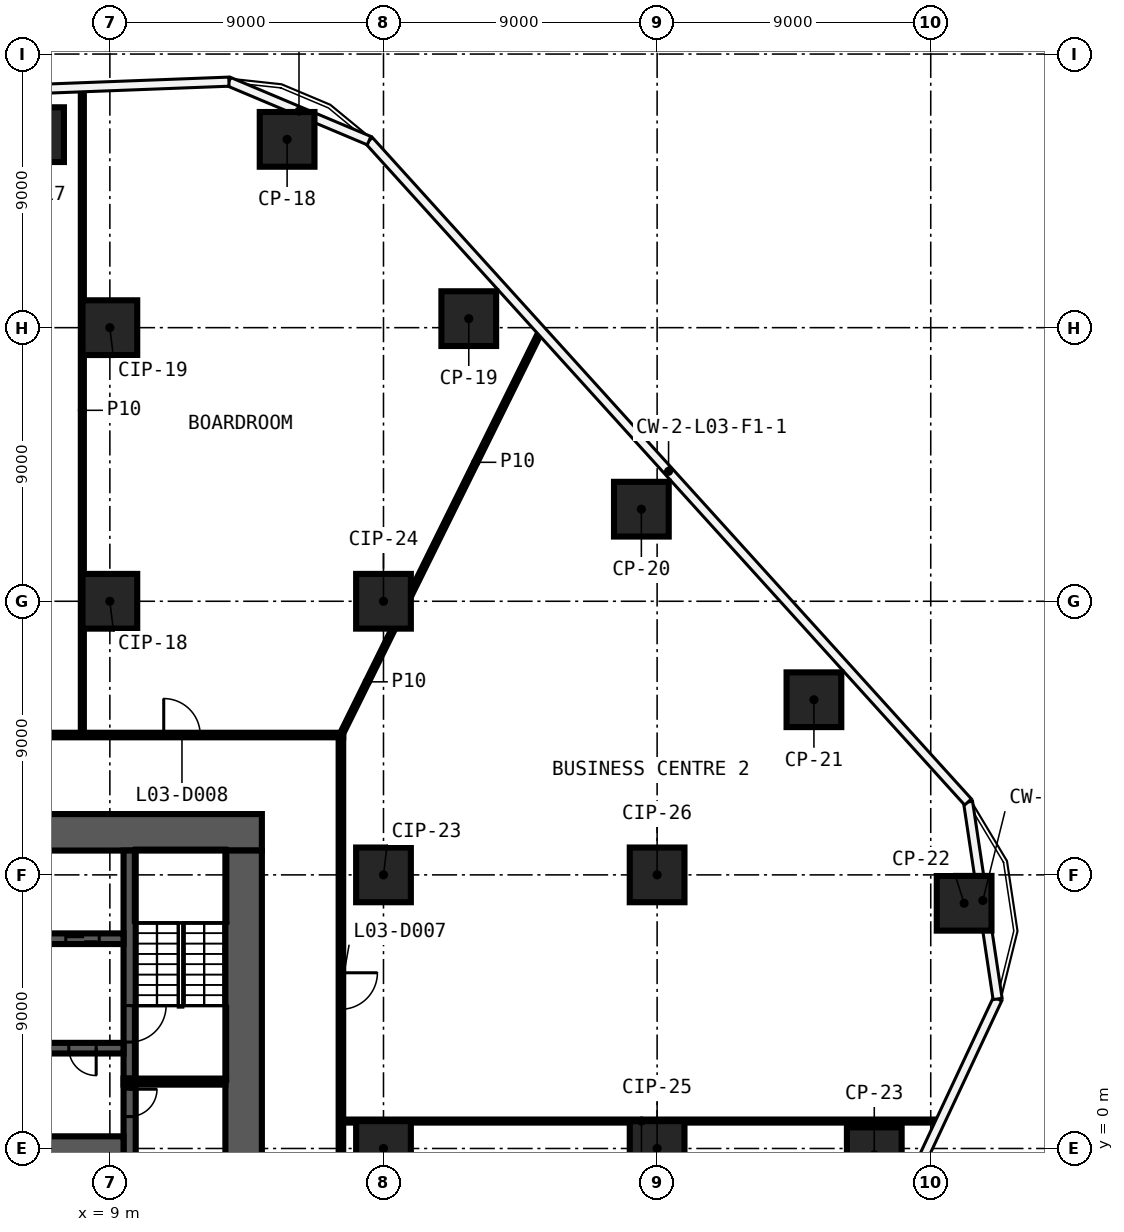
"""IFC4 building model, lengths in metres.
Left out: names, types, materials, properties, quantities, classifications, styles, units other than length and angle.
Written with IfcOpenShell. Run it as: python <this file> out.ifc"""

import sys

from ifc_helpers import new_model, si_unit, direction, frame, frame_2d, origin, origin_2d, place, context, subcontext, project, spatial, rectangle, extrude, element, fill, save


model = new_model("IFC4")
c1 = context("Model", 3, precision=1e-05, world=origin(), true_north=direction((0.0, 1.0)))
c2 = subcontext(c1, "Body", "Model", "MODEL_VIEW")
j1 = project(units=[si_unit("LENGTHUNIT", "METRE"), si_unit("PLANEANGLEUNIT", "RADIAN")], contexts=[c1])
p1 = place(None, origin())
s1 = spatial("IfcSite", under=j1, at=p1, CompositionType="ELEMENT")
p2 = place(p1, origin())
s2 = spatial("IfcBuilding", under=s1, at=p2, CompositionType="ELEMENT")
p3 = place(p2, frame((0.0, 0.0, 27.0)))
s3 = spatial("IfcBuildingStorey", under=s2, at=p3, CompositionType="ELEMENT", Elevation=27.0)
for number, where, z_axis, x_axis in (
    (1, (6.589, 33.349, 0.0), (0.0, 0.0, 1.0), (1.0, 0.0, 0.0)),
    (2, (14.83, 33.194, 0.0), (0.0, 0.0, 1.0), (1.0, 0.0, 0.0)),
    (3, (20.805, 27.297, 0.0), (0.0, 0.0, 1.0), (1.0, 0.0, 0.0)),
    (4, (26.482, 21.029, 0.0), (0.0, 0.0, 1.0), (1.0, 0.0, 0.0)),
    (5, (32.158, 14.761, 0.0), (0.0, 0.0, 1.0), (1.0, 0.0, 0.0)),
    (6, (37.098, 8.066, 0.0), (0.0, 0.0, 1.0), (1.0, 0.0, 0.0)),
    (7, (34.143, -0.205, 0.0), (0.0, 0.0, 1.0), (1.0, 0.0, 0.0)),
    (8, (9.0, 18.0, 0.0), (0.0, 0.0, 1.0), (1.0, 0.0, 0.0)),
    (9, (9.0, 27.0, 0.0), (0.0, 0.0, 1.0), (1.0, 0.0, 0.0)),
    (10, (18.0, 0.0, 0.0), (0.0, 0.0, 1.0), (1.0, 0.0, 0.0)),
    (11, (18.0, 9.0, 0.0), (0.0, 0.0, 1.0), (1.0, 0.0, 0.0)),
    (12, (18.0, 18.0, 0.0), (0.0, 0.0, 1.0), (1.0, 0.0, 0.0)),
    (13, (27.0, 0.0, 0.0), (0.0, 0.0, 1.0), (1.0, 0.0, 0.0)),
    (14, (27.0, 9.0, 0.0), (0.0, 0.0, 1.0), (1.0, 0.0, 0.0)),
):
    element("IfcColumn", number, at=place(p3, frame(where, z_axis=z_axis, x_axis=x_axis)), inside=s3, PredefinedType="COLUMN", context=c2, shape_type="SweptSolid", body=[
        extrude(rectangle(XDim=1.8, YDim=1.8, at=origin_2d()), origin(), (0.0, 0.0, 1.0), 5.55),
    ])
p4 = place(p3, frame((16.675, 0.902, 0.0), z_axis=(0.0, 0.0, 1.0), x_axis=(1.0, 0.0, 0.0)))
e15 = element("IfcWall", 15, at=p4, inside=s3, PredefinedType="PARTITIONING", context=c2, shape_type="SweptSolid", body=[
    extrude(rectangle(XDim=19.621, YDim=0.1, at=frame_2d((9.811, 0.0))), origin(), (0.0, 0.0, 1.0), 5.55),
])
p5 = place(p3, frame((-16.675, 13.6, 0.0), z_axis=(0.0, 0.0, 1.0), x_axis=(1.0, 0.0, 0.0)))
e16 = element("IfcWall", 16, at=p5, inside=s3, PredefinedType="PARTITIONING", context=c2, shape_type="SweptSolid", body=[
    extrude(rectangle(XDim=33.35, YDim=0.15, at=frame_2d((16.675, 0.0))), origin(), (0.0, 0.0, 1.0), 5.55),
])
p6 = place(p5, frame((27.447, 0.0, 0.0)))
e17 = element("IfcOpeningElement", 17, at=p6, cuts=e16, PredefinedType="OPENING", context=c2, shape_type="SweptSolid", body=[
    extrude(rectangle(XDim=1.2, YDim=2.1, at=frame_2d((0.6, 1.05))), frame((0.0, 0.085, 0.0), z_axis=(0.0, -1.0, 0.0), x_axis=(1.0, 0.0, 0.0)), (0.0, 0.0, 1.0), 0.17),
])
p7 = place(p5, frame((19.346, 0.0, 0.0)))
e18 = element("IfcOpeningElement", 18, at=p7, cuts=e16, PredefinedType="OPENING", context=c2, shape_type="SweptSolid", body=[
    extrude(rectangle(XDim=1.2, YDim=2.1, at=frame_2d((0.6, 1.05))), frame((0.0, 0.085, 0.0), z_axis=(0.0, -1.0, 0.0), x_axis=(1.0, 0.0, 0.0)), (0.0, 0.0, 1.0), 0.17),
])
p8 = place(p3, frame((16.6, 13.6, 0.0), z_axis=(0.0, 0.0, 1.0), x_axis=(0.443207247844, 0.896419173969, 0.0)))
e19 = element("IfcWall", 19, at=p8, inside=s3, PredefinedType="PARTITIONING", context=c2, shape_type="SweptSolid", body=[
    extrude(rectangle(XDim=3.905, YDim=0.1, at=frame_2d((1.952, 0.0))), origin(), (0.0, 0.0, 1.0), 5.55),
])
p9 = place(p3, frame((18.9, 18.253, 0.0), z_axis=(0.0, 0.0, 1.0), x_axis=(0.443225904803, 0.89640994936, 0.0)))
e20 = element("IfcWall", 20, at=p9, inside=s3, PredefinedType="PARTITIONING", context=c2, shape_type="SweptSolid", body=[
    extrude(rectangle(XDim=9.635, YDim=0.1, at=frame_2d((4.817, 0.0))), origin(), (0.0, 0.0, 1.0), 5.55),
])
p10 = place(p3, frame((16.6, 13.525, 0.0), z_axis=(0.0, 0.0, 1.0), x_axis=(0.0, -1.0, 0.0)))
e21 = element("IfcWall", 21, at=p10, inside=s3, PredefinedType="PARTITIONING", context=c2, shape_type="SweptSolid", body=[
    extrude(rectangle(XDim=27.05, YDim=0.15, at=frame_2d((13.525, 0.0))), origin(), (0.0, 0.0, 1.0), 5.55),
])
p11 = place(p10, frame((16.006, 0.0, 0.0)))
e22 = element("IfcOpeningElement", 22, at=p11, cuts=e21, PredefinedType="OPENING", context=c2, shape_type="SweptSolid", body=[
    extrude(rectangle(XDim=1.2, YDim=2.1, at=frame_2d((0.6, 1.05))), frame((0.0, 0.085, 0.0), z_axis=(0.0, -1.0, 0.0), x_axis=(1.0, 0.0, 0.0)), (0.0, 0.0, 1.0), 0.17),
])
p12 = place(p10, frame((7.745, 0.0, 0.0)))
e23 = element("IfcOpeningElement", 23, at=p12, cuts=e21, PredefinedType="OPENING", context=c2, shape_type="SweptSolid", body=[
    extrude(rectangle(XDim=1.2, YDim=2.1, at=frame_2d((0.6, 1.05))), frame((0.0, 0.085, 0.0), z_axis=(0.0, -1.0, 0.0), x_axis=(1.0, 0.0, 0.0)), (0.0, 0.0, 1.0), 0.17),
])
p13 = place(p3, frame((8.095, 13.675, 0.0), z_axis=(0.0, 0.0, 1.0), x_axis=(0.0, 1.0, 0.0)))
e24 = element("IfcWall", 24, at=p13, inside=s3, PredefinedType="PARTITIONING", context=c2, shape_type="SweptSolid", body=[
    extrude(rectangle(XDim=21.213, YDim=0.1, at=frame_2d((10.606, 0.0))), origin(), (0.0, 0.0, 1.0), 5.55),
])
p14 = place(p3, frame((-14.0, 10.4, 0.0), z_axis=(0.0, 0.0, 1.0), x_axis=(1.0, 0.0, 0.0)))
e25 = element("IfcWall", 25, at=p14, inside=s3, PredefinedType="SHEAR", context=c2, shape_type="SweptSolid", body=[
    extrude(rectangle(XDim=28.0, YDim=1.2, at=frame_2d((14.0, 0.0))), origin(), (0.0, 0.0, 1.0), 5.55),
])
p15 = place(p14, frame((15.9, 0.0, 0.0)))
e26 = element("IfcOpeningElement", 26, at=p15, cuts=e25, PredefinedType="OPENING", context=c2, shape_type="SweptSolid", body=[
    extrude(rectangle(XDim=1.6, YDim=2.1, at=frame_2d((0.8, 1.05))), frame((0.0, 0.61, 0.0), z_axis=(0.0, -1.0, 0.0), x_axis=(1.0, 0.0, 0.0)), (0.0, 0.0, 1.0), 1.22),
])
p16 = place(p3, frame((13.4, 9.8, 0.0), z_axis=(0.0, 0.0, 1.0), x_axis=(0.0, -1.0, 0.0)))
e27 = element("IfcWall", 27, at=p16, inside=s3, PredefinedType="SHEAR", context=c2, shape_type="SweptSolid", body=[
    extrude(rectangle(XDim=19.6, YDim=1.2, at=frame_2d((9.8, 0.0))), origin(), (0.0, 0.0, 1.0), 5.55),
])
p17 = place(p3, frame((9.65, 2.1, 0.0), z_axis=(0.0, 0.0, 1.0), x_axis=(0.0, -1.0, 0.0)))
e28 = element("IfcWall", 28, at=p17, inside=s3, PredefinedType="SHEAR", context=c2, shape_type="SweptSolid", body=[
    extrude(rectangle(XDim=4.2, YDim=0.4, at=frame_2d((2.1, 0.0))), origin(), (0.0, 0.0, 1.0), 5.55),
])
p18 = place(p17, frame((0.15, 0.0, 0.0)))
e29 = element("IfcOpeningElement", 29, at=p18, cuts=e28, PredefinedType="OPENING", context=c2, shape_type="SweptSolid", body=[
    extrude(rectangle(XDim=0.9, YDim=2.1, at=frame_2d((0.45, 1.05))), frame((0.0, 0.21, 0.0), z_axis=(0.0, -1.0, 0.0), x_axis=(1.0, 0.0, 0.0)), (0.0, 0.0, 1.0), 0.42),
])
p19 = place(p3, frame((9.65, 9.8, 0.0), z_axis=(0.0, 0.0, 1.0), x_axis=(0.0, -1.0, 0.0)))
e30 = element("IfcWall", 30, at=p19, inside=s3, PredefinedType="SHEAR", context=c2, shape_type="SweptSolid", body=[
    extrude(rectangle(XDim=7.5, YDim=0.4, at=frame_2d((3.75, 0.0))), origin(), (0.0, 0.0, 1.0), 5.55),
])
p20 = place(p19, frame((5.1, 0.0, 0.0)))
e31 = element("IfcOpeningElement", 31, at=p20, cuts=e30, PredefinedType="OPENING", context=c2, shape_type="SweptSolid", body=[
    extrude(rectangle(XDim=1.2, YDim=2.1, at=frame_2d((0.6, 1.05))), frame((0.0, 0.21, 0.0), z_axis=(0.0, -1.0, 0.0), x_axis=(1.0, 0.0, 0.0)), (0.0, 0.0, 1.0), 0.42),
])
p21 = place(p3, frame((9.45, 2.2, 0.0), z_axis=(0.0, 0.0, 1.0), x_axis=(1.0, 0.0, 0.0)))
e32 = element("IfcWall", 32, at=p21, inside=s3, PredefinedType="SHEAR", context=c2, shape_type="SweptSolid", body=[
    extrude(rectangle(XDim=3.35, YDim=0.2, at=frame_2d((1.675, 0.0))), origin(), (0.0, 0.0, 1.0), 5.55),
])
p22 = place(p3, frame((-9.45, 6.9, 0.0), z_axis=(0.0, 0.0, 1.0), x_axis=(1.0, 0.0, 0.0)))
e33 = element("IfcWall", 33, at=p22, inside=s3, PredefinedType="SHEAR", context=c2, shape_type="SweptSolid", body=[
    extrude(rectangle(XDim=18.9, YDim=0.35, at=frame_2d((9.45, 0.0))), origin(), (0.0, 0.0, 1.0), 5.55),
])
p23 = place(p22, frame((0.8, 0.0, 0.0)))
e34 = element("IfcOpeningElement", 34, at=p23, cuts=e33, PredefinedType="OPENING", context=c2, shape_type="SweptSolid", body=[
    extrude(rectangle(XDim=1.1, YDim=2.1, at=frame_2d((0.55, 1.05))), frame((0.0, 0.185, 0.0), z_axis=(0.0, -1.0, 0.0), x_axis=(1.0, 0.0, 0.0)), (0.0, 0.0, 1.0), 0.37),
])
p24 = place(p22, frame((3.5, 0.0, 0.0)))
e35 = element("IfcOpeningElement", 35, at=p24, cuts=e33, PredefinedType="OPENING", context=c2, shape_type="SweptSolid", body=[
    extrude(rectangle(XDim=1.1, YDim=2.1, at=frame_2d((0.55, 1.05))), frame((0.0, 0.185, 0.0), z_axis=(0.0, -1.0, 0.0), x_axis=(1.0, 0.0, 0.0)), (0.0, 0.0, 1.0), 0.37),
])
p25 = place(p22, frame((6.2, 0.0, 0.0)))
e36 = element("IfcOpeningElement", 36, at=p25, cuts=e33, PredefinedType="OPENING", context=c2, shape_type="SweptSolid", body=[
    extrude(rectangle(XDim=1.1, YDim=2.1, at=frame_2d((0.55, 1.05))), frame((0.0, 0.185, 0.0), z_axis=(0.0, -1.0, 0.0), x_axis=(1.0, 0.0, 0.0)), (0.0, 0.0, 1.0), 0.37),
])
p26 = place(p22, frame((8.9, 0.0, 0.0)))
e37 = element("IfcOpeningElement", 37, at=p26, cuts=e33, PredefinedType="OPENING", context=c2, shape_type="SweptSolid", body=[
    extrude(rectangle(XDim=1.1, YDim=2.1, at=frame_2d((0.55, 1.05))), frame((0.0, 0.185, 0.0), z_axis=(0.0, -1.0, 0.0), x_axis=(1.0, 0.0, 0.0)), (0.0, 0.0, 1.0), 0.37),
])
p27 = place(p22, frame((11.55, 0.0, 0.0)))
e38 = element("IfcOpeningElement", 38, at=p27, cuts=e33, PredefinedType="OPENING", context=c2, shape_type="SweptSolid", body=[
    extrude(rectangle(XDim=1.2, YDim=2.1, at=frame_2d((0.6, 1.05))), frame((0.0, 0.185, 0.0), z_axis=(0.0, -1.0, 0.0), x_axis=(1.0, 0.0, 0.0)), (0.0, 0.0, 1.0), 0.37),
])
p28 = place(p22, frame((14.3, 0.0, 0.0)))
e39 = element("IfcOpeningElement", 39, at=p28, cuts=e33, PredefinedType="OPENING", context=c2, shape_type="SweptSolid", body=[
    extrude(rectangle(XDim=1.1, YDim=2.1, at=frame_2d((0.55, 1.05))), frame((0.0, 0.185, 0.0), z_axis=(0.0, -1.0, 0.0), x_axis=(1.0, 0.0, 0.0)), (0.0, 0.0, 1.0), 0.37),
])
p29 = place(p22, frame((17.0, 0.0, 0.0)))
e40 = element("IfcOpeningElement", 40, at=p29, cuts=e33, PredefinedType="OPENING", context=c2, shape_type="SweptSolid", body=[
    extrude(rectangle(XDim=1.1, YDim=2.1, at=frame_2d((0.55, 1.05))), frame((0.0, 0.185, 0.0), z_axis=(0.0, -1.0, 0.0), x_axis=(1.0, 0.0, 0.0)), (0.0, 0.0, 1.0), 0.37),
])
p30 = place(p3, frame((9.45, 3.3, 0.0), z_axis=(0.0, 0.0, 1.0), x_axis=(-1.0, 0.0, 0.0)))
e41 = element("IfcWall", 41, at=p30, inside=s3, PredefinedType="SHEAR", context=c2, shape_type="SweptSolid", body=[
    extrude(rectangle(XDim=18.9, YDim=0.35, at=frame_2d((9.45, 0.0))), origin(), (0.0, 0.0, 1.0), 5.55),
])
p31 = place(p30, frame((17.0, 0.0, 0.0)))
e42 = element("IfcOpeningElement", 42, at=p31, cuts=e41, PredefinedType="OPENING", context=c2, shape_type="SweptSolid", body=[
    extrude(rectangle(XDim=1.1, YDim=2.1, at=frame_2d((0.55, 1.05))), frame((0.0, 0.185, 0.0), z_axis=(0.0, -1.0, 0.0), x_axis=(1.0, 0.0, 0.0)), (0.0, 0.0, 1.0), 0.37),
])
p32 = place(p30, frame((14.3, 0.0, 0.0)))
e43 = element("IfcOpeningElement", 43, at=p32, cuts=e41, PredefinedType="OPENING", context=c2, shape_type="SweptSolid", body=[
    extrude(rectangle(XDim=1.1, YDim=2.1, at=frame_2d((0.55, 1.05))), frame((0.0, 0.185, 0.0), z_axis=(0.0, -1.0, 0.0), x_axis=(1.0, 0.0, 0.0)), (0.0, 0.0, 1.0), 0.37),
])
p33 = place(p30, frame((11.6, 0.0, 0.0)))
e44 = element("IfcOpeningElement", 44, at=p33, cuts=e41, PredefinedType="OPENING", context=c2, shape_type="SweptSolid", body=[
    extrude(rectangle(XDim=1.1, YDim=2.1, at=frame_2d((0.55, 1.05))), frame((0.0, 0.185, 0.0), z_axis=(0.0, -1.0, 0.0), x_axis=(1.0, 0.0, 0.0)), (0.0, 0.0, 1.0), 0.37),
])
p34 = place(p30, frame((8.9, 0.0, 0.0)))
e45 = element("IfcOpeningElement", 45, at=p34, cuts=e41, PredefinedType="OPENING", context=c2, shape_type="SweptSolid", body=[
    extrude(rectangle(XDim=1.1, YDim=2.1, at=frame_2d((0.55, 1.05))), frame((0.0, 0.185, 0.0), z_axis=(0.0, -1.0, 0.0), x_axis=(1.0, 0.0, 0.0)), (0.0, 0.0, 1.0), 0.37),
])
p35 = place(p30, frame((6.2, 0.0, 0.0)))
e46 = element("IfcOpeningElement", 46, at=p35, cuts=e41, PredefinedType="OPENING", context=c2, shape_type="SweptSolid", body=[
    extrude(rectangle(XDim=1.1, YDim=2.1, at=frame_2d((0.55, 1.05))), frame((0.0, 0.185, 0.0), z_axis=(0.0, -1.0, 0.0), x_axis=(1.0, 0.0, 0.0)), (0.0, 0.0, 1.0), 0.37),
])
p36 = place(p30, frame((3.5, 0.0, 0.0)))
e47 = element("IfcOpeningElement", 47, at=p36, cuts=e41, PredefinedType="OPENING", context=c2, shape_type="SweptSolid", body=[
    extrude(rectangle(XDim=1.1, YDim=2.1, at=frame_2d((0.55, 1.05))), frame((0.0, 0.185, 0.0), z_axis=(0.0, -1.0, 0.0), x_axis=(1.0, 0.0, 0.0)), (0.0, 0.0, 1.0), 0.37),
])
p37 = place(p30, frame((0.9, 0.0, 0.0)))
e48 = element("IfcOpeningElement", 48, at=p37, cuts=e41, PredefinedType="OPENING", context=c2, shape_type="SweptSolid", body=[
    extrude(rectangle(XDim=0.9, YDim=2.1, at=frame_2d((0.45, 1.05))), frame((0.0, 0.185, 0.0), z_axis=(0.0, -1.0, 0.0), x_axis=(1.0, 0.0, 0.0)), (0.0, 0.0, 1.0), 0.37),
])
p38 = place(p3, frame((-9.45, 0.0, 0.0), z_axis=(0.0, 0.0, 1.0), x_axis=(1.0, 0.0, 0.0)))
e49 = element("IfcWall", 49, at=p38, inside=s3, PredefinedType="SHEAR", context=c2, shape_type="SweptSolid", body=[
    extrude(rectangle(XDim=18.9, YDim=0.8, at=frame_2d((9.45, 0.0))), origin(), (0.0, 0.0, 1.0), 5.55),
])
p39 = place(p12, origin())
e50 = element("IfcDoor", 50, at=p39, inside=s3, OperationType="SINGLE_SWING_RIGHT", PredefinedType="DOOR", context=c2, shape_type="SweptSolid", body=[
    extrude(rectangle(XDim=1.2, YDim=2.1, at=frame_2d((0.6, 1.05))), frame((0.0, 0.025, 0.0), z_axis=(0.0, -1.0, 0.0), x_axis=(1.0, 0.0, 0.0)), (0.0, 0.0, 1.0), 0.05),
])
fill(e23, e50)
p40 = place(p6, origin())
e51 = element("IfcDoor", 51, at=p40, inside=s3, OperationType="SINGLE_SWING_LEFT", PredefinedType="DOOR", context=c2, shape_type="SweptSolid", body=[
    extrude(rectangle(XDim=1.2, YDim=2.1, at=frame_2d((0.6, 1.05))), frame((0.0, 0.025, 0.0), z_axis=(0.0, -1.0, 0.0), x_axis=(1.0, 0.0, 0.0)), (0.0, 0.0, 1.0), 0.05),
])
fill(e17, e51)
p41 = place(p18, origin())
e52 = element("IfcDoor", 52, at=p41, inside=s3, OperationType="SINGLE_SWING_RIGHT", PredefinedType="DOOR", context=c2, shape_type="SweptSolid", body=[
    extrude(rectangle(XDim=0.9, YDim=2.1, at=frame_2d((0.45, 1.05))), frame((0.0, 0.025, 0.0), z_axis=(0.0, -1.0, 0.0), x_axis=(1.0, 0.0, 0.0)), (0.0, 0.0, 1.0), 0.05),
])
fill(e29, e52)
p42 = place(p29, origin())
e53 = element("IfcDoor", 53, at=p42, inside=s3, OperationType="DOUBLE_DOOR_SLIDING", PredefinedType="DOOR", context=c2, shape_type="SweptSolid", body=[
    extrude(rectangle(XDim=1.1, YDim=2.1, at=frame_2d((0.55, 1.05))), frame((0.0, 0.025, 0.0), z_axis=(0.0, -1.0, 0.0), x_axis=(1.0, 0.0, 0.0)), (0.0, 0.0, 1.0), 0.05),
])
fill(e40, e53)
p43 = place(p37, origin())
e54 = element("IfcDoor", 54, at=p43, inside=s3, OperationType="SINGLE_SWING_LEFT", PredefinedType="DOOR", context=c2, shape_type="SweptSolid", body=[
    extrude(rectangle(XDim=0.9, YDim=2.1, at=frame_2d((0.45, 1.05))), frame((0.0, 0.025, 0.0), z_axis=(0.0, -1.0, 0.0), x_axis=(1.0, 0.0, 0.0)), (0.0, 0.0, 1.0), 0.05),
])
fill(e48, e54)
p44 = place(p20, origin())
e55 = element("IfcDoor", 55, at=p44, inside=s3, OperationType="SINGLE_SWING_LEFT", PredefinedType="DOOR", context=c2, shape_type="SweptSolid", body=[
    extrude(rectangle(XDim=1.2, YDim=2.1, at=frame_2d((0.6, 1.05))), frame((0.0, 0.025, 0.0), z_axis=(0.0, -1.0, 0.0), x_axis=(1.0, 0.0, 0.0)), (0.0, 0.0, 1.0), 0.05),
])
fill(e31, e55)
save(model, sys.argv[1])
